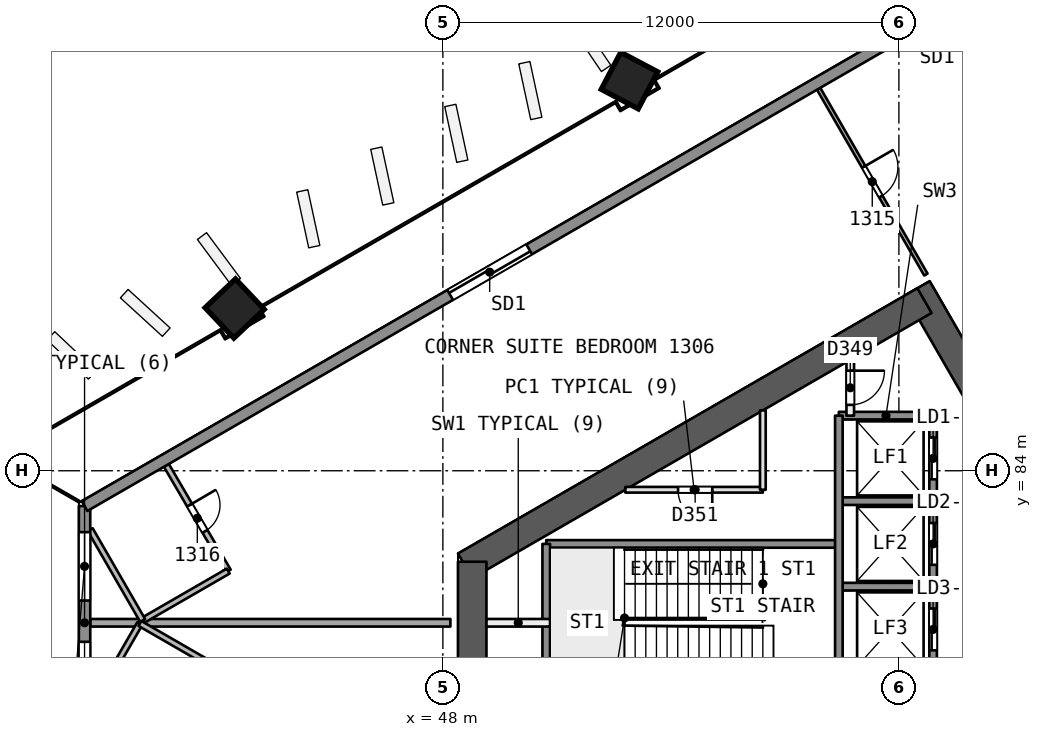
"""IFC4 building model, lengths in metres.
Left out: names, types, materials, properties, quantities, classifications, styles, units other than length and angle.
Written with IfcOpenShell. Run it as: python <this file> out.ifc"""

import sys

from ifc_helpers import new_model, si_unit, direction, frame, frame_2d, origin, origin_2d, place, context, subcontext, project, spatial, rectangle, extrude, element, fill, save


model = new_model("IFC4")
c1 = context("Model", 3, precision=1e-05, world=origin(), true_north=direction((0.0, 1.0)))
c2 = subcontext(c1, "Body", "Model", "MODEL_VIEW")
j1 = project(units=[si_unit("LENGTHUNIT", "METRE"), si_unit("PLANEANGLEUNIT", "RADIAN")], contexts=[c1])
p1 = place(None, origin())
s1 = spatial("IfcSite", under=j1, at=p1, CompositionType="ELEMENT")
p2 = place(p1, origin())
s2 = spatial("IfcBuilding", under=s1, at=p2, CompositionType="ELEMENT")
p3 = place(p2, frame((0.0, 0.0, 61.0)))
s3 = spatial("IfcBuildingStorey", under=s2, at=p3, CompositionType="ELEMENT", Elevation=61.0)
p4 = place(p3, frame((65.567, 80.0, 0.0), z_axis=(0.0, 0.0, 1.0), x_axis=(-0.499988615364, 0.866031976607, 0.0)))
e1 = element("IfcWall", 1, at=p4, inside=s3, PredefinedType="SHEAR", context=c2, shape_type="SweptSolid", body=[
    extrude(rectangle(XDim=10.163, YDim=0.75, at=frame_2d((5.082, 0.0))), origin(), (0.0, 0.0, 1.0), 3.7),
])
p5 = place(p4, frame((0.733, 0.0, 0.0)))
e2 = element("IfcOpeningElement", 2, at=p5, cuts=e1, PredefinedType="OPENING", context=c2, shape_type="SweptSolid", body=[
    extrude(rectangle(XDim=1.2, YDim=2.1, at=frame_2d((0.6, 1.05))), frame((0.0, 0.385, 0.0), z_axis=(0.0, -1.0, 0.0), x_axis=(1.0, 0.0, 0.0)), (0.0, 0.0, 1.0), 0.771),
])
p6 = place(p3, frame((60.673, 88.477, 0.0), z_axis=(0.0, 0.0, 1.0), x_axis=(-0.8660248072, -0.500001033313, 0.0)))
e3 = element("IfcWall", 3, at=p6, inside=s3, PredefinedType="SHEAR", context=c2, shape_type="SweptSolid", body=[
    extrude(rectangle(XDim=13.958, YDim=0.75, at=frame_2d((6.979, 0.0))), origin(), (0.0, 0.0, 1.0), 3.7),
])
p7 = place(p3, frame((48.772, 81.606, 0.0), z_axis=(0.0, 0.0, 1.0), x_axis=(0.0, -1.0, 0.0)))
e4 = element("IfcWall", 4, at=p7, inside=s3, PredefinedType="SHEAR", context=c2, shape_type="SweptSolid", body=[
    extrude(rectangle(XDim=3.429, YDim=0.75, at=frame_2d((1.714, 0.0))), origin(), (0.0, 0.0, 1.0), 3.7),
])
p8 = place(p3, frame((60.673, 71.523, 0.0), z_axis=(0.0, 0.0, 1.0), x_axis=(0.499997052475, 0.866027105532, 0.0)))
e5 = element("IfcWall", 5, at=p8, inside=s3, PredefinedType="SHEAR", context=c2, shape_type="SweptSolid", body=[
    extrude(rectangle(XDim=10.005, YDim=0.75, at=frame_2d((5.002, 0.0))), origin(), (0.0, 0.0, 1.0), 3.7),
])
p9 = place(p8, frame((7.855, 0.0, 0.0)))
e6 = element("IfcOpeningElement", 6, at=p9, cuts=e5, PredefinedType="OPENING", context=c2, shape_type="SweptSolid", body=[
    extrude(rectangle(XDim=1.2, YDim=2.1, at=frame_2d((0.6, 1.05))), frame((0.0, 0.385, 0.0), z_axis=(0.0, -1.0, 0.0), x_axis=(1.0, 0.0, 0.0)), (0.0, 0.0, 1.0), 0.771),
])
p10 = place(p3, frame((52.887, 94.281, 0.0), z_axis=(0.019328516974, -0.012138044789, 0.999739504221), x_axis=(-0.500208848309, 0.865669585777, 0.020181088508)))
e7 = element("IfcColumn", 7, at=p10, inside=s3, PredefinedType="COLUMN", context=c2, shape_type="SweptSolid", body=[
    extrude(rectangle(XDim=1.1, YDim=1.1, at=origin_2d()), origin(), (0.0, 0.0, 1.0), 3.701),
])
p11 = place(p3, frame((42.487, 88.276, 0.0), z_axis=(0.028493212074, -0.006793520471, 0.999570900409), x_axis=(-0.499957806748, 0.865815646522, 0.020135980476)))
e8 = element("IfcColumn", 8, at=p11, inside=s3, PredefinedType="COLUMN", context=c2, shape_type="SweptSolid", body=[
    extrude(rectangle(XDim=1.1, YDim=1.1, at=origin_2d()), origin(), (0.0, 0.0, 1.0), 3.702),
])
p12 = place(p3, frame((57.887, 94.051, 0.0), z_axis=(0.0, 0.0, 1.0), x_axis=(0.49999444814, -0.866028609128, 0.0)))
e9 = element("IfcWall", 9, at=p12, inside=s3, PredefinedType="PARTITIONING", context=c2, shape_type="SweptSolid", body=[
    extrude(rectangle(XDim=5.646, YDim=0.1, at=frame_2d((2.823, 0.0))), origin(), (0.0, 0.0, 1.0), 3.2),
])
p13 = place(p12, frame((2.373, 0.0, 0.0)))
e10 = element("IfcOpeningElement", 10, at=p13, cuts=e9, PredefinedType="OPENING", context=c2, shape_type="SweptSolid", body=[
    extrude(rectangle(XDim=0.9, YDim=2.1, at=frame_2d((0.45, 1.05))), frame((0.0, 0.061, 0.0), z_axis=(0.0, -1.0, 0.0), x_axis=(1.0, 0.0, 0.0)), (0.0, 0.0, 1.0), 0.121),
])
p14 = place(p3, frame((40.724, 84.142, 0.0), z_axis=(0.0, 0.0, 1.0), x_axis=(0.505076014617, -0.863074863183, 0.0)))
e11 = element("IfcWall", 11, at=p14, inside=s3, PredefinedType="PARTITIONING", context=c2, shape_type="SweptSolid", body=[
    extrude(rectangle(XDim=3.224, YDim=0.15, at=frame_2d((1.612, 0.0))), origin(), (0.0, 0.0, 1.0), 3.2),
])
p15 = place(p14, frame((1.212, 0.0, 0.0)))
e12 = element("IfcOpeningElement", 12, at=p15, cuts=e11, PredefinedType="OPENING", context=c2, shape_type="SweptSolid", body=[
    extrude(rectangle(XDim=0.8, YDim=2.1, at=frame_2d((0.4, 1.05))), frame((0.0, 0.085, 0.0), z_axis=(0.0, -1.0, 0.0), x_axis=(1.0, 0.0, 0.0)), (0.0, 0.0, 1.0), 0.171),
])
p16 = place(p3, frame((42.352, 81.36, 0.0), z_axis=(0.0, 0.0, 1.0), x_axis=(-0.865997922154, -0.500047596559, 0.0)))
e13 = element("IfcWall", 13, at=p16, inside=s3, PredefinedType="PARTITIONING", context=c2, shape_type="SweptSolid", body=[
    extrude(rectangle(XDim=2.6, YDim=0.15, at=frame_2d((1.3, 0.0))), origin(), (0.0, 0.0, 1.0), 3.2),
])
p17 = place(p3, frame((40.1, 80.06, 0.0), z_axis=(0.0, 0.0, 1.0), x_axis=(-0.50001084716, 0.866019141083, 0.0)))
e14 = element("IfcWall", 14, at=p17, inside=s3, PredefinedType="PARTITIONING", context=c2, shape_type="SweptSolid", body=[
    extrude(rectangle(XDim=2.76, YDim=0.15, at=frame_2d((1.38, 0.0))), origin(), (0.0, 0.0, 1.0), 3.2),
])
p18 = place(p3, frame((38.72, 80.0, 0.0), z_axis=(0.0, 0.0, 1.0), x_axis=(1.0, 0.0, 0.0)))
e15 = element("IfcWall", 15, at=p18, inside=s3, PredefinedType="PARTITIONING", context=c2, shape_type="SweptSolid", body=[
    extrude(rectangle(XDim=9.478, YDim=0.2, at=frame_2d((4.739, 0.0))), origin(), (0.0, 0.0, 1.0), 3.2),
])
p19 = place(p3, frame((38.72, 77.718, 0.0), z_axis=(0.0, 0.0, 1.0), x_axis=(0.499964911226, 0.86604566135, 0.0)))
e16 = element("IfcWall", 16, at=p19, inside=s3, PredefinedType="PARTITIONING", context=c2, shape_type="SweptSolid", body=[
    extrude(rectangle(XDim=2.615, YDim=0.15, at=frame_2d((1.308, 0.0))), origin(), (0.0, 0.0, 1.0), 3.2),
])
p20 = place(p3, frame((40.028, 79.982, 0.0), z_axis=(0.0, 0.0, 1.0), x_axis=(0.866021400173, -0.500006934395, 0.0)))
e17 = element("IfcWall", 17, at=p20, inside=s3, PredefinedType="PARTITIONING", context=c2, shape_type="SweptSolid", body=[
    extrude(rectangle(XDim=2.6, YDim=0.15, at=frame_2d((1.3, 0.0))), origin(), (0.0, 0.0, 1.0), 3.2),
])
p21 = place(p3, frame((38.571, 76.929, 0.0), z_axis=(0.0, 0.0, 1.0), x_axis=(0.0, 1.0, 0.0)))
e18 = element("IfcWall", 18, at=p21, inside=s3, PredefinedType="SOLIDWALL", context=c2, shape_type="SweptSolid", body=[
    extrude(rectangle(XDim=6.143, YDim=0.3, at=frame_2d((3.071, 0.0))), origin(), (0.0, 0.0, 1.0), 3.2),
])
p22 = place(p21, frame((3.656, 0.0, 0.9)))
e19 = element("IfcOpeningElement", 19, at=p22, cuts=e18, PredefinedType="OPENING", context=c2, shape_type="SweptSolid", body=[
    extrude(rectangle(XDim=1.8, YDim=1.5, at=frame_2d((0.9, 0.75))), frame((0.0, 0.161, 0.0), z_axis=(0.0, -1.0, 0.0), x_axis=(1.0, 0.0, 0.0)), (0.0, 0.0, 1.0), 0.321),
])
p23 = place(p21, frame((0.771, 0.0, 0.9)))
e20 = element("IfcOpeningElement", 20, at=p23, cuts=e18, PredefinedType="OPENING", context=c2, shape_type="SweptSolid", body=[
    extrude(rectangle(XDim=1.8, YDim=1.5, at=frame_2d((0.9, 0.75))), frame((0.0, 0.161, 0.0), z_axis=(0.0, -1.0, 0.0), x_axis=(1.0, 0.0, 0.0)), (0.0, 0.0, 1.0), 0.321),
])
p24 = place(p3, frame((38.571, 83.071, 0.0), z_axis=(0.0, 0.0, 1.0), x_axis=(0.866024926003, 0.500000827541, 0.0)))
e21 = element("IfcWall", 21, at=p24, inside=s3, PredefinedType="SOLIDWALL", context=c2, shape_type="SweptSolid", body=[
    extrude(rectangle(XDim=60.025, YDim=0.3, at=frame_2d((30.013, 0.0))), origin(), (0.0, 0.0, 1.0), 3.2),
])
p25 = place(p24, frame((33.489, 0.0, 0.0)))
e22 = element("IfcOpeningElement", 22, at=p25, cuts=e21, PredefinedType="OPENING", context=c2, shape_type="SweptSolid", body=[
    extrude(rectangle(XDim=2.4, YDim=2.4, at=frame_2d((1.2, 1.2))), frame((0.0, 0.161, 0.0), z_axis=(0.0, -1.0, 0.0), x_axis=(1.0, 0.0, 0.0)), (0.0, 0.0, 1.0), 0.321),
])
p26 = place(p24, frame((46.558, 0.0, 0.0)))
e23 = element("IfcOpeningElement", 23, at=p26, cuts=e21, PredefinedType="OPENING", context=c2, shape_type="SweptSolid", body=[
    extrude(rectangle(XDim=2.4, YDim=2.4, at=frame_2d((1.2, 1.2))), frame((0.0, 0.161, 0.0), z_axis=(0.0, -1.0, 0.0), x_axis=(1.0, 0.0, 0.0)), (0.0, 0.0, 1.0), 0.321),
])
p27 = place(p24, frame((24.136, 0.0, 0.0)))
e24 = element("IfcOpeningElement", 24, at=p27, cuts=e21, PredefinedType="OPENING", context=c2, shape_type="SweptSolid", body=[
    extrude(rectangle(XDim=2.4, YDim=2.4, at=frame_2d((1.2, 1.2))), frame((0.0, 0.161, 0.0), z_axis=(0.0, -1.0, 0.0), x_axis=(1.0, 0.0, 0.0)), (0.0, 0.0, 1.0), 0.321),
])
p28 = place(p24, frame((11.109, 0.0, 0.0)))
e25 = element("IfcOpeningElement", 25, at=p28, cuts=e21, PredefinedType="OPENING", context=c2, shape_type="SweptSolid", body=[
    extrude(rectangle(XDim=2.4, YDim=2.4, at=frame_2d((1.2, 1.2))), frame((0.0, 0.161, 0.0), z_axis=(0.0, -1.0, 0.0), x_axis=(1.0, 0.0, 0.0)), (0.0, 0.0, 1.0), 0.321),
])
p29 = place(p24, frame((28.813, 0.0, 0.0)))
e26 = element("IfcOpeningElement", 26, at=p29, cuts=e21, PredefinedType="OPENING", context=c2, shape_type="SweptSolid", body=[
    extrude(rectangle(XDim=2.4, YDim=2.4, at=frame_2d((1.2, 1.2))), frame((0.0, 0.161, 0.0), z_axis=(0.0, -1.0, 0.0), x_axis=(1.0, 0.0, 0.0)), (0.0, 0.0, 1.0), 0.321),
])
p30 = place(p3, frame((60.9, 85.45, 0.0), z_axis=(0.0, 0.0, 1.0), x_axis=(-1.0, 0.0, 0.0)))
e27 = element("IfcWall", 27, at=p30, inside=s3, PredefinedType="SOLIDWALL", context=c2, shape_type="SweptSolid", body=[
    extrude(rectangle(XDim=2.48, YDim=0.2, at=frame_2d((1.24, 0.0))), origin(), (0.0, 0.0, 1.0), 3.2),
])
p31 = place(p3, frame((56.42, 83.5, 0.0), z_axis=(0.0, 0.0, 1.0), x_axis=(-1.0, 0.0, 0.0)))
e28 = element("IfcWall", 28, at=p31, inside=s3, PredefinedType="PARTITIONING", context=c2, shape_type="SweptSolid", body=[
    extrude(rectangle(XDim=3.618, YDim=0.15, at=frame_2d((1.809, 0.0))), origin(), (0.0, 0.0, 1.0), 3.2),
])
p32 = place(p31, frame((1.332, 0.0, 0.0)))
e29 = element("IfcOpeningElement", 29, at=p32, cuts=e28, PredefinedType="OPENING", context=c2, shape_type="SweptSolid", body=[
    extrude(rectangle(XDim=0.9, YDim=2.1, at=frame_2d((0.45, 1.05))), frame((0.0, 0.085, 0.0), z_axis=(0.0, -1.0, 0.0), x_axis=(1.0, 0.0, 0.0)), (0.0, 0.0, 1.0), 0.171),
])
p33 = place(p3, frame((60.9, 83.2, 0.0), z_axis=(0.0, 0.0, 1.0), x_axis=(-1.0, 0.0, 0.0)))
e30 = element("IfcWall", 30, at=p33, inside=s3, PredefinedType="SOLIDWALL", context=c2, shape_type="SweptSolid", body=[
    extrude(rectangle(XDim=2.48, YDim=0.2, at=frame_2d((1.24, 0.0))), origin(), (0.0, 0.0, 1.0), 3.2),
])
p34 = place(p3, frame((58.42, 82.075, 0.0), z_axis=(0.0, 0.0, 1.0), x_axis=(-1.0, 0.0, 0.0)))
e31 = element("IfcWall", 31, at=p34, inside=s3, PredefinedType="SOLIDWALL", context=c2, shape_type="SweptSolid", body=[
    extrude(rectangle(XDim=7.7, YDim=0.2, at=frame_2d((3.85, 0.0))), origin(), (0.0, 0.0, 1.0), 3.2),
])
p35 = place(p3, frame((60.9, 80.95, 0.0), z_axis=(0.0, 0.0, 1.0), x_axis=(-1.0, 0.0, 0.0)))
e32 = element("IfcWall", 32, at=p35, inside=s3, PredefinedType="SOLIDWALL", context=c2, shape_type="SweptSolid", body=[
    extrude(rectangle(XDim=2.48, YDim=0.2, at=frame_2d((1.24, 0.0))), origin(), (0.0, 0.0, 1.0), 3.2),
])
p36 = place(p3, frame((50.82, 80.0, 0.0), z_axis=(0.0, 0.0, 1.0), x_axis=(-1.0, 0.0, 0.0)))
e33 = element("IfcWall", 33, at=p36, inside=s3, PredefinedType="PARTITIONING", context=c2, shape_type="SweptSolid", body=[
    extrude(rectangle(XDim=1.673, YDim=0.2, at=frame_2d((0.836, 0.0))), origin(), (0.0, 0.0, 1.0), 3.2),
])
p37 = place(p3, frame((60.9, 85.45, 0.0), z_axis=(0.0, 0.0, 1.0), x_axis=(0.0, -1.0, 0.0)))
e34 = element("IfcWall", 34, at=p37, inside=s3, PredefinedType="SOLIDWALL", context=c2, shape_type="SweptSolid", body=[
    extrude(rectangle(XDim=10.9, YDim=0.2, at=frame_2d((5.45, 0.0))), origin(), (0.0, 0.0, 1.0), 3.2),
])
p38 = place(p37, frame((0.575, 0.0, 0.0)))
e35 = element("IfcOpeningElement", 35, at=p38, cuts=e34, PredefinedType="OPENING", context=c2, shape_type="SweptSolid", body=[
    extrude(rectangle(XDim=1.1, YDim=2.1, at=frame_2d((0.55, 1.05))), frame((0.0, 0.11, 0.0), z_axis=(0.0, -1.0, 0.0), x_axis=(1.0, 0.0, 0.0)), (0.0, 0.0, 1.0), 0.221),
])
p39 = place(p37, frame((2.825, 0.0, 0.0)))
e36 = element("IfcOpeningElement", 36, at=p39, cuts=e34, PredefinedType="OPENING", context=c2, shape_type="SweptSolid", body=[
    extrude(rectangle(XDim=1.1, YDim=2.1, at=frame_2d((0.55, 1.05))), frame((0.0, 0.11, 0.0), z_axis=(0.0, -1.0, 0.0), x_axis=(1.0, 0.0, 0.0)), (0.0, 0.0, 1.0), 0.221),
])
p40 = place(p37, frame((5.075, 0.0, 0.0)))
e37 = element("IfcOpeningElement", 37, at=p40, cuts=e34, PredefinedType="OPENING", context=c2, shape_type="SweptSolid", body=[
    extrude(rectangle(XDim=1.1, YDim=2.1, at=frame_2d((0.55, 1.05))), frame((0.0, 0.11, 0.0), z_axis=(0.0, -1.0, 0.0), x_axis=(1.0, 0.0, 0.0)), (0.0, 0.0, 1.0), 0.221),
])
p41 = place(p37, frame((7.325, 0.0, 0.0)))
e38 = element("IfcOpeningElement", 38, at=p41, cuts=e34, PredefinedType="OPENING", context=c2, shape_type="SweptSolid", body=[
    extrude(rectangle(XDim=1.1, YDim=2.1, at=frame_2d((0.55, 1.05))), frame((0.0, 0.11, 0.0), z_axis=(0.0, -1.0, 0.0), x_axis=(1.0, 0.0, 0.0)), (0.0, 0.0, 1.0), 0.221),
])
p42 = place(p3, frame((58.72, 86.917, 0.0), z_axis=(0.0, 0.0, 1.0), x_axis=(0.0, -1.0, 0.0)))
e39 = element("IfcWall", 39, at=p42, inside=s3, PredefinedType="PARTITIONING", context=c2, shape_type="SweptSolid", body=[
    extrude(rectangle(XDim=1.467, YDim=0.2, at=frame_2d((0.733, 0.0))), origin(), (0.0, 0.0, 1.0), 3.2),
])
p43 = place(p42, frame((0.283, 0.0, 0.0)))
e40 = element("IfcOpeningElement", 40, at=p43, cuts=e39, PredefinedType="OPENING", context=c2, shape_type="SweptSolid", body=[
    extrude(rectangle(XDim=0.9, YDim=2.1, at=frame_2d((0.45, 1.05))), frame((0.0, 0.11, 0.0), z_axis=(0.0, -1.0, 0.0), x_axis=(1.0, 0.0, 0.0)), (0.0, 0.0, 1.0), 0.221),
])
p44 = place(p3, frame((58.42, 85.45, 0.0), z_axis=(0.0, 0.0, 1.0), x_axis=(0.0, -1.0, 0.0)))
e41 = element("IfcWall", 41, at=p44, inside=s3, PredefinedType="SOLIDWALL", context=c2, shape_type="SweptSolid", body=[
    extrude(rectangle(XDim=9.0, YDim=0.2, at=frame_2d((4.5, 0.0))), origin(), (0.0, 0.0, 1.0), 3.2),
])
p45 = place(p3, frame((56.42, 85.589, 0.0), z_axis=(0.0, 0.0, 1.0), x_axis=(0.0, -1.0, 0.0)))
e42 = element("IfcWall", 42, at=p45, inside=s3, PredefinedType="PARTITIONING", context=c2, shape_type="SweptSolid", body=[
    extrude(rectangle(XDim=2.089, YDim=0.15, at=frame_2d((1.044, 0.0))), origin(), (0.0, 0.0, 1.0), 3.2),
])
p46 = place(p3, frame((50.72, 82.075, 0.0), z_axis=(0.0, 0.0, 1.0), x_axis=(0.0, -1.0, 0.0)))
e43 = element("IfcWall", 43, at=p46, inside=s3, PredefinedType="SOLIDWALL", context=c2, shape_type="SweptSolid", body=[
    extrude(rectangle(XDim=4.15, YDim=0.2, at=frame_2d((2.075, 0.0))), origin(), (0.0, 0.0, 1.0), 3.2),
])
p47 = place(p13, origin())
e44 = element("IfcDoor", 44, at=p47, inside=s3, OperationType="SINGLE_SWING_LEFT", PredefinedType="NOTDEFINED", context=c2, shape_type="SweptSolid", body=[
    extrude(rectangle(XDim=0.9, YDim=2.1, at=frame_2d((0.45, 1.05))), frame((0.0, 0.025, 0.0), z_axis=(0.0, -1.0, 0.0), x_axis=(1.0, 0.0, 0.0)), (0.0, 0.0, 1.0), 0.05),
])
fill(e10, e44)
p48 = place(p15, origin())
e45 = element("IfcDoor", 45, at=p48, inside=s3, OperationType="SINGLE_SWING_LEFT", PredefinedType="NOTDEFINED", context=c2, shape_type="SweptSolid", body=[
    extrude(rectangle(XDim=0.8, YDim=2.1, at=frame_2d((0.4, 1.05))), frame((0.0, 0.025, 0.0), z_axis=(0.0, -1.0, 0.0), x_axis=(1.0, 0.0, 0.0)), (0.0, 0.0, 1.0), 0.05),
])
fill(e12, e45)
p49 = place(p22, origin())
e46 = element("IfcWindow", 46, at=p49, inside=s3, PartitioningType="SINGLE_PANEL", PredefinedType="WINDOW", context=c2, shape_type="SweptSolid", body=[
    extrude(rectangle(XDim=1.8, YDim=1.5, at=frame_2d((0.9, 0.75))), frame((0.0, 0.03, 0.0), z_axis=(0.0, -1.0, 0.0), x_axis=(1.0, 0.0, 0.0)), (0.0, 0.0, 1.0), 0.06),
])
fill(e19, e46)
p50 = place(p23, origin())
e47 = element("IfcWindow", 47, at=p50, inside=s3, PartitioningType="SINGLE_PANEL", PredefinedType="WINDOW", context=c2, shape_type="SweptSolid", body=[
    extrude(rectangle(XDim=1.8, YDim=1.5, at=frame_2d((0.9, 0.75))), frame((0.0, 0.03, 0.0), z_axis=(0.0, -1.0, 0.0), x_axis=(1.0, 0.0, 0.0)), (0.0, 0.0, 1.0), 0.06),
])
fill(e20, e47)
p51 = place(p28, origin())
e48 = element("IfcDoor", 48, at=p51, inside=s3, OperationType="SLIDING_TO_RIGHT", PredefinedType="NOTDEFINED", context=c2, shape_type="SweptSolid", body=[
    extrude(rectangle(XDim=2.4, YDim=2.4, at=frame_2d((1.2, 1.2))), frame((0.0, 0.025, 0.0), z_axis=(0.0, -1.0, 0.0), x_axis=(1.0, 0.0, 0.0)), (0.0, 0.0, 1.0), 0.05),
])
fill(e25, e48)
p52 = place(p38, origin())
e49 = element("IfcDoor", 49, at=p52, inside=s3, OperationType="SLIDING_TO_RIGHT", PredefinedType="NOTDEFINED", context=c2, shape_type="SweptSolid", body=[
    extrude(rectangle(XDim=1.1, YDim=2.1, at=frame_2d((0.55, 1.05))), frame((0.0, 0.025, 0.0), z_axis=(0.0, -1.0, 0.0), x_axis=(1.0, 0.0, 0.0)), (0.0, 0.0, 1.0), 0.05),
])
fill(e35, e49)
p53 = place(p39, origin())
e50 = element("IfcDoor", 50, at=p53, inside=s3, OperationType="SLIDING_TO_LEFT", PredefinedType="NOTDEFINED", context=c2, shape_type="SweptSolid", body=[
    extrude(rectangle(XDim=1.1, YDim=2.1, at=frame_2d((0.55, 1.05))), frame((0.0, 0.025, 0.0), z_axis=(0.0, -1.0, 0.0), x_axis=(1.0, 0.0, 0.0)), (0.0, 0.0, 1.0), 0.05),
])
fill(e36, e50)
p54 = place(p40, origin())
e51 = element("IfcDoor", 51, at=p54, inside=s3, OperationType="SLIDING_TO_RIGHT", PredefinedType="NOTDEFINED", context=c2, shape_type="SweptSolid", body=[
    extrude(rectangle(XDim=1.1, YDim=2.1, at=frame_2d((0.55, 1.05))), frame((0.0, 0.025, 0.0), z_axis=(0.0, -1.0, 0.0), x_axis=(1.0, 0.0, 0.0)), (0.0, 0.0, 1.0), 0.05),
])
fill(e37, e51)
p55 = place(p43, origin())
e52 = element("IfcDoor", 52, at=p55, inside=s3, OperationType="SINGLE_SWING_LEFT", PredefinedType="NOTDEFINED", context=c2, shape_type="SweptSolid", body=[
    extrude(rectangle(XDim=0.9, YDim=2.1, at=frame_2d((0.45, 1.05))), frame((0.0, 0.025, 0.0), z_axis=(0.0, -1.0, 0.0), x_axis=(1.0, 0.0, 0.0)), (0.0, 0.0, 1.0), 0.05),
])
fill(e40, e52)
p56 = place(p32, origin())
e53 = element("IfcDoor", 53, at=p56, inside=s3, OperationType="SINGLE_SWING_LEFT", PredefinedType="NOTDEFINED", context=c2, shape_type="SweptSolid", body=[
    extrude(rectangle(XDim=0.9, YDim=2.1, at=frame_2d((0.45, 1.05))), frame((0.0, 0.025, 0.0), z_axis=(0.0, -1.0, 0.0), x_axis=(1.0, 0.0, 0.0)), (0.0, 0.0, 1.0), 0.05),
])
fill(e29, e53)
save(model, sys.argv[1])
